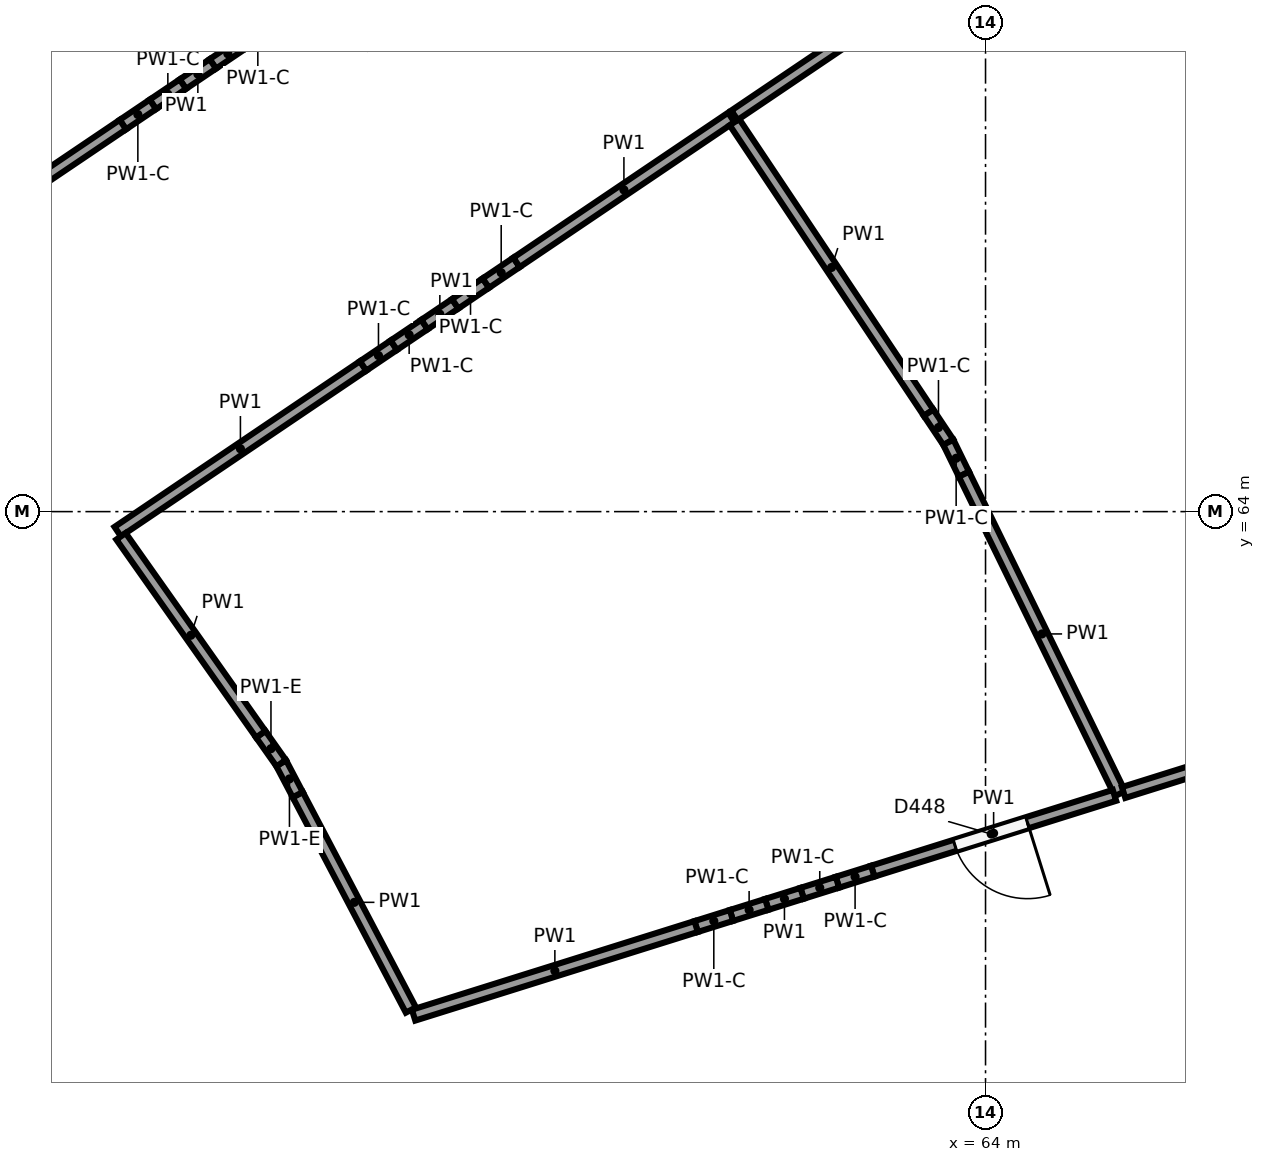
"""IFC4 building model, lengths in metres.
Left out: names, types, materials, properties, quantities, classifications, styles, units other than length and angle.
Written with IfcOpenShell. Run it as: python <this file> out.ifc"""

import sys

from ifc_helpers import new_model, si_unit, direction, frame, frame_2d, origin, origin_2d, place, context, subcontext, project, spatial, rectangle, circle, extrude, element, fill, save


model = new_model("IFC4")
c1 = context("Model", 3, precision=1e-05, world=origin(), true_north=direction((0.0, 1.0)))
c2 = subcontext(c1, "Body", "Model", "MODEL_VIEW")
j1 = project(units=[si_unit("LENGTHUNIT", "METRE"), si_unit("PLANEANGLEUNIT", "RADIAN")], contexts=[c1])
p1 = place(None, origin())
s1 = spatial("IfcSite", under=j1, at=p1, CompositionType="ELEMENT")
p2 = place(p1, origin())
s2 = spatial("IfcBuilding", under=s1, at=p2, CompositionType="ELEMENT")
p3 = place(p2, frame((0.0, 0.0, -4.0)))
s3 = spatial("IfcBuildingStorey", under=s2, at=p3, CompositionType="ELEMENT", Elevation=-4.0)
p4 = place(p3, frame((61.723, 56.716, -0.4), z_axis=(0.0, 0.0, 1.0), x_axis=(1.0, 0.0, 0.0)))
e1 = element("IfcColumn", 1, at=p4, inside=s3, PredefinedType="COLUMN", context=c2, shape_type="SweptSolid", body=[
    extrude(circle(Radius=0.45, at=origin_2d()), origin(), (0.0, 0.0, 1.0), 4.4),
])
p5 = place(p3, frame((62.964, 57.104, -0.4), z_axis=(0.0, 0.0, 1.0), x_axis=(1.0, 0.0, 0.0)))
e2 = element("IfcColumn", 2, at=p5, inside=s3, PredefinedType="COLUMN", context=c2, shape_type="SweptSolid", body=[
    extrude(circle(Radius=0.4, at=origin_2d()), origin(), (0.0, 0.0, 1.0), 4.4),
])
for number, where, z_axis, x_axis in (
    (3, (54.364, 60.513, -0.4), (0.0, 0.0, 1.0), (1.0, 0.0, 0.0)),
    (4, (59.049, 62.766, -0.4), (0.0, 0.0, 1.0), (1.0, 0.0, 0.0)),
):
    element("IfcColumn", number, at=place(p3, frame(where, z_axis=z_axis, x_axis=x_axis)), inside=s3, PredefinedType="COLUMN", context=c2, shape_type="SweptSolid", body=[
        extrude(circle(Radius=0.45, at=origin_2d()), origin(), (0.0, 0.0, 1.0), 4.4),
    ])
p6 = place(p3, frame((60.222, 63.331, -0.4), z_axis=(0.0, 0.0, 1.0), x_axis=(1.0, 0.0, 0.0)))
e5 = element("IfcColumn", 5, at=p6, inside=s3, PredefinedType="COLUMN", context=c2, shape_type="SweptSolid", body=[
    extrude(circle(Radius=0.4, at=origin_2d()), origin(), (0.0, 0.0, 1.0), 4.4),
])
p7 = place(p3, frame((54.82, 67.902, -0.4), z_axis=(0.0, 0.0, 1.0), x_axis=(1.0, 0.0, 0.0)))
e6 = element("IfcColumn", 6, at=p7, inside=s3, PredefinedType="COLUMN", context=c2, shape_type="SweptSolid", body=[
    extrude(circle(Radius=0.45, at=origin_2d()), origin(), (0.0, 0.0, 1.0), 4.4),
])
p8 = place(p3, frame((55.94, 68.658, -0.4), z_axis=(0.0, 0.0, 1.0), x_axis=(1.0, 0.0, 0.0)))
e7 = element("IfcColumn", 7, at=p8, inside=s3, PredefinedType="COLUMN", context=c2, shape_type="SweptSolid", body=[
    extrude(circle(Radius=0.4, at=origin_2d()), origin(), (0.0, 0.0, 1.0), 4.4),
])
p9 = place(p3, frame((52.582, 63.737, 0.0), z_axis=(0.0, 0.0, 1.0), x_axis=(0.82882615394, 0.559506216718, 0.0)))
e8 = element("IfcWall", 8, at=p9, inside=s3, PredefinedType="PARTITIONING", context=c2, shape_type="SweptSolid", body=[
    extrude(rectangle(XDim=3.896, YDim=0.15, at=frame_2d((1.948, 0.0))), origin(), (0.0, 0.0, 1.0), 3.6),
])
p10 = place(p3, frame((55.811, 65.917, 0.0), z_axis=(0.0, 0.0, 1.0), x_axis=(0.828953242646, 0.559317907372, 0.0)))
e9 = element("IfcWall", 9, at=p10, inside=s3, PredefinedType="PARTITIONING", context=c2, shape_type="SweptSolid", body=[
    extrude(rectangle(XDim=0.487, YDim=0.15, at=frame_2d((0.244, 0.0))), origin(), (0.0, 0.0, 1.0), 2.7),
])
p11 = place(p3, frame((56.215, 66.189, 0.0), z_axis=(0.0, 0.0, 1.0), x_axis=(0.828796357195, 0.559550353678, 0.0)))
e10 = element("IfcWall", 10, at=p11, inside=s3, PredefinedType="PARTITIONING", context=c2, shape_type="SweptSolid", body=[
    extrude(rectangle(XDim=0.487, YDim=0.15, at=frame_2d((0.243, 0.0))), origin(), (0.0, 0.0, 1.0), 2.7),
])
p12 = place(p3, frame((56.618, 66.461, 0.0), z_axis=(0.0, 0.0, 1.0), x_axis=(0.828953242646, 0.559317907372, 0.0)))
e11 = element("IfcWall", 11, at=p12, inside=s3, PredefinedType="PARTITIONING", context=c2, shape_type="SweptSolid", body=[
    extrude(rectangle(XDim=0.487, YDim=0.15, at=frame_2d((0.244, 0.0))), origin(), (0.0, 0.0, 1.0), 3.6),
])
p13 = place(p3, frame((57.022, 66.734, 0.0), z_axis=(0.0, 0.0, 1.0), x_axis=(0.828563830016, 0.559894614717, 0.0)))
e12 = element("IfcWall", 12, at=p13, inside=s3, PredefinedType="PARTITIONING", context=c2, shape_type="SweptSolid", body=[
    extrude(rectangle(XDim=0.487, YDim=0.15, at=frame_2d((0.244, 0.0))), origin(), (0.0, 0.0, 1.0), 2.7),
])
p14 = place(p3, frame((57.426, 67.007, 0.0), z_axis=(0.0, 0.0, 1.0), x_axis=(0.828796357195, 0.559550353678, 0.0)))
e13 = element("IfcWall", 13, at=p14, inside=s3, PredefinedType="PARTITIONING", context=c2, shape_type="SweptSolid", body=[
    extrude(rectangle(XDim=0.487, YDim=0.15, at=frame_2d((0.243, 0.0))), origin(), (0.0, 0.0, 1.0), 2.7),
])
p15 = place(p3, frame((57.829, 67.279, 0.0), z_axis=(0.0, 0.0, 1.0), x_axis=(0.828841201566, 0.559483925226, 0.0)))
e14 = element("IfcWall", 14, at=p15, inside=s3, PredefinedType="PARTITIONING", context=c2, shape_type="SweptSolid", body=[
    extrude(rectangle(XDim=3.409, YDim=0.15, at=frame_2d((1.705, 0.0))), origin(), (0.0, 0.0, 1.0), 3.6),
])
p16 = place(p3, frame((60.697, 69.124, 0.0), z_axis=(0.0, 0.0, 1.0), x_axis=(0.555582071925, -0.831461701677, 0.0)))
e15 = element("IfcWall", 15, at=p16, inside=s3, PredefinedType="PARTITIONING", context=c2, shape_type="SweptSolid", body=[
    extrude(rectangle(XDim=4.598, YDim=0.15, at=frame_2d((2.299, 0.0))), origin(), (0.0, 0.0, 1.0), 3.6),
])
p17 = place(p3, frame((63.251, 65.301, 0.0), z_axis=(0.0, 0.0, 1.0), x_axis=(0.555302810798, -0.831648235927, 0.0)))
e16 = element("IfcWall", 16, at=p17, inside=s3, PredefinedType="PARTITIONING", context=c2, shape_type="SweptSolid", body=[
    extrude(rectangle(XDim=0.467, YDim=0.15, at=frame_2d((0.234, 0.0))), origin(), (0.0, 0.0, 1.0), 2.7),
])
p18 = place(p3, frame((63.511, 64.912, 0.0), z_axis=(0.0, 0.0, 1.0), x_axis=(0.439050948337, -0.898462166574, 0.0)))
e17 = element("IfcWall", 17, at=p18, inside=s3, PredefinedType="PARTITIONING", context=c2, shape_type="SweptSolid", body=[
    extrude(rectangle(XDim=0.468, YDim=0.15, at=frame_2d((0.234, 0.0))), origin(), (0.0, 0.0, 1.0), 2.7),
])
p19 = place(p3, frame((63.716, 64.492, 0.0), z_axis=(0.0, 0.0, 1.0), x_axis=(0.438947034321, -0.898512938728, 0.0)))
e18 = element("IfcWall", 18, at=p19, inside=s3, PredefinedType="PARTITIONING", context=c2, shape_type="SweptSolid", body=[
    extrude(rectangle(XDim=4.677, YDim=0.15, at=frame_2d((2.338, 0.0))), origin(), (0.0, 0.0, 1.0), 3.6),
])
p20 = place(p3, frame((65.697, 60.267, 0.0), z_axis=(0.0, 0.0, 1.0), x_axis=(-0.95420717929, -0.299146551026, 0.0)))
e19 = element("IfcWall", 19, at=p20, inside=s3, PredefinedType="PARTITIONING", context=c2, shape_type="SweptSolid", body=[
    extrude(rectangle(XDim=3.333, YDim=0.15, at=frame_2d((1.667, 0.0))), origin(), (0.0, 0.0, 1.0), 3.6),
])
p21 = place(p20, frame((1.2, 0.0, 0.0)))
e20 = element("IfcOpeningElement", 20, at=p21, cuts=e19, PredefinedType="OPENING", context=c2, shape_type="SweptSolid", body=[
    extrude(rectangle(XDim=1.0, YDim=2.1, at=frame_2d((0.5, 1.05))), frame((0.0, 0.085, 0.0), z_axis=(0.0, -1.0, 0.0), x_axis=(1.0, 0.0, 0.0)), (0.0, 0.0, 1.0), 0.17),
])
p22 = place(p3, frame((62.516, 59.27, 0.0), z_axis=(0.0, 0.0, 1.0), x_axis=(-0.954194187562, -0.299187988432, 0.0)))
e21 = element("IfcWall", 21, at=p22, inside=s3, PredefinedType="PARTITIONING", context=c2, shape_type="SweptSolid", body=[
    extrude(rectangle(XDim=0.487, YDim=0.15, at=frame_2d((0.244, 0.0))), origin(), (0.0, 0.0, 1.0), 2.7),
])
p23 = place(p3, frame((62.051, 59.124, 0.0), z_axis=(0.0, 0.0, 1.0), x_axis=(-0.954149295482, -0.299331124226, 0.0)))
e22 = element("IfcWall", 22, at=p23, inside=s3, PredefinedType="PARTITIONING", context=c2, shape_type="SweptSolid", body=[
    extrude(rectangle(XDim=0.487, YDim=0.15, at=frame_2d((0.243, 0.0))), origin(), (0.0, 0.0, 1.0), 2.7),
])
p24 = place(p3, frame((61.587, 58.978, 0.0), z_axis=(0.0, 0.0, 1.0), x_axis=(-0.954194187562, -0.299187988432, 0.0)))
e23 = element("IfcWall", 23, at=p24, inside=s3, PredefinedType="PARTITIONING", context=c2, shape_type="SweptSolid", body=[
    extrude(rectangle(XDim=0.487, YDim=0.15, at=frame_2d((0.244, 0.0))), origin(), (0.0, 0.0, 1.0), 3.6),
])
p25 = place(p3, frame((61.122, 58.833, 0.0), z_axis=(0.0, 0.0, 1.0), x_axis=(-0.954292408643, -0.298874553627, 0.0)))
e24 = element("IfcWall", 24, at=p25, inside=s3, PredefinedType="PARTITIONING", context=c2, shape_type="SweptSolid", body=[
    extrude(rectangle(XDim=0.487, YDim=0.15, at=frame_2d((0.243, 0.0))), origin(), (0.0, 0.0, 1.0), 2.7),
])
p26 = place(p3, frame((60.657, 58.687, 0.0), z_axis=(0.0, 0.0, 1.0), x_axis=(-0.954194187562, -0.299187988432, 0.0)))
e25 = element("IfcWall", 25, at=p26, inside=s3, PredefinedType="PARTITIONING", context=c2, shape_type="SweptSolid", body=[
    extrude(rectangle(XDim=0.487, YDim=0.15, at=frame_2d((0.244, 0.0))), origin(), (0.0, 0.0, 1.0), 2.7),
])
p27 = place(p3, frame((60.192, 58.541, 0.0), z_axis=(0.0, 0.0, 1.0), x_axis=(-0.954184030199, -0.299220381178, 0.0)))
e26 = element("IfcWall", 26, at=p27, inside=s3, PredefinedType="PARTITIONING", context=c2, shape_type="SweptSolid", body=[
    extrude(rectangle(XDim=3.896, YDim=0.15, at=frame_2d((1.948, 0.0))), origin(), (0.0, 0.0, 1.0), 3.6),
])
p28 = place(p3, frame((56.439, 57.443, 0.0), z_axis=(0.0, 0.0, 1.0), x_axis=(-0.465186694802, 0.885212595357, 0.0)))
e27 = element("IfcWall", 27, at=p28, inside=s3, PredefinedType="PARTITIONING", context=c2, shape_type="SweptSolid", body=[
    extrude(rectangle(XDim=3.2, YDim=0.15, at=frame_2d((1.6, 0.0))), origin(), (0.0, 0.0, 1.0), 3.6),
])
p29 = place(p3, frame((54.95, 60.276, 0.0), z_axis=(0.0, 0.0, 1.0), x_axis=(-0.465058676895, 0.885279858036, 0.0)))
e28 = element("IfcWall", 28, at=p29, inside=s3, PredefinedType="PARTITIONING", context=c2, shape_type="SweptSolid", body=[
    extrude(rectangle(XDim=0.468, YDim=0.15, at=frame_2d((0.234, 0.0))), origin(), (0.0, 0.0, 1.0), 2.85),
])
p30 = place(p3, frame((54.733, 60.691, 0.0), z_axis=(0.0, 0.0, 1.0), x_axis=(-0.576868319656, 0.816837157442, 0.0)))
e29 = element("IfcWall", 29, at=p30, inside=s3, PredefinedType="PARTITIONING", context=c2, shape_type="SweptSolid", body=[
    extrude(rectangle(XDim=0.466, YDim=0.15, at=frame_2d((0.233, 0.0))), origin(), (0.0, 0.0, 1.0), 2.85),
])
p31 = place(p3, frame((54.464, 61.071, 0.0), z_axis=(0.0, 0.0, 1.0), x_axis=(-0.576788435752, 0.816893567353, 0.0)))
e30 = element("IfcWall", 30, at=p31, inside=s3, PredefinedType="PARTITIONING", context=c2, shape_type="SweptSolid", body=[
    extrude(rectangle(XDim=3.188, YDim=0.15, at=frame_2d((1.594, 0.0))), origin(), (0.0, 0.0, 1.0), 3.6),
])
p32 = place(p3, frame((60.696, 69.214, 0.0), z_axis=(0.0, 0.0, 1.0), x_axis=(0.828825631308, 0.559506990919, 0.0)))
e31 = element("IfcWall", 31, at=p32, inside=s3, PredefinedType="PARTITIONING", context=c2, shape_type="SweptSolid", body=[
    extrude(rectangle(XDim=3.931, YDim=0.15, at=frame_2d((1.965, 0.0))), origin(), (0.0, 0.0, 1.0), 3.6),
])
p33 = place(p3, frame((69.97, 61.607, 0.0), z_axis=(0.0, 0.0, 1.0), x_axis=(-0.954191084053, -0.299197886211, 0.0)))
e32 = element("IfcWall", 32, at=p33, inside=s3, PredefinedType="PARTITIONING", context=c2, shape_type="SweptSolid", body=[
    extrude(rectangle(XDim=4.353, YDim=0.15, at=frame_2d((2.176, 0.0))), origin(), (0.0, 0.0, 1.0), 3.6),
])
p34 = place(p3, frame((54.228, 70.157, 0.0), z_axis=(0.0, 0.0, 1.0), x_axis=(-0.828961577554, -0.559305554182, 0.0)))
e33 = element("IfcWall", 33, at=p34, inside=s3, PredefinedType="PARTITIONING", context=c2, shape_type="SweptSolid", body=[
    extrude(rectangle(XDim=0.476, YDim=0.15, at=frame_2d((0.238, 0.0))), origin(), (0.0, 0.0, 1.0), 2.7),
])
p35 = place(p3, frame((53.833, 69.89, 0.0), z_axis=(0.0, 0.0, 1.0), x_axis=(-0.828563254438, -0.559895466489, 0.0)))
e34 = element("IfcWall", 34, at=p35, inside=s3, PredefinedType="PARTITIONING", context=c2, shape_type="SweptSolid", body=[
    extrude(rectangle(XDim=0.476, YDim=0.15, at=frame_2d((0.238, 0.0))), origin(), (0.0, 0.0, 1.0), 3.6),
])
p36 = place(p3, frame((53.439, 69.624, 0.0), z_axis=(0.0, 0.0, 1.0), x_axis=(-0.828961577554, -0.559305554182, 0.0)))
e35 = element("IfcWall", 35, at=p36, inside=s3, PredefinedType="PARTITIONING", context=c2, shape_type="SweptSolid", body=[
    extrude(rectangle(XDim=0.476, YDim=0.15, at=frame_2d((0.238, 0.0))), origin(), (0.0, 0.0, 1.0), 2.7),
])
p37 = place(p3, frame((53.044, 69.357, 0.0), z_axis=(0.0, 0.0, 1.0), x_axis=(-0.828801105453, -0.559543320575, 0.0)))
e36 = element("IfcWall", 36, at=p37, inside=s3, PredefinedType="PARTITIONING", context=c2, shape_type="SweptSolid", body=[
    extrude(rectangle(XDim=0.476, YDim=0.15, at=frame_2d((0.238, 0.0))), origin(), (0.0, 0.0, 1.0), 2.7),
])
p38 = place(p3, frame((52.65, 69.091, 0.0), z_axis=(0.0, 0.0, 1.0), x_axis=(-0.828831583129, -0.559498174088, 0.0)))
e37 = element("IfcWall", 37, at=p38, inside=s3, PredefinedType="PARTITIONING", context=c2, shape_type="SweptSolid", body=[
    extrude(rectangle(XDim=3.809, YDim=0.15, at=frame_2d((1.904, 0.0))), origin(), (0.0, 0.0, 1.0), 3.6),
])
p39 = place(p21, origin())
e38 = element("IfcDoor", 38, at=p39, inside=s3, OperationType="SINGLE_SWING_LEFT", PredefinedType="DOOR", context=c2, shape_type="SweptSolid", body=[
    extrude(rectangle(XDim=1.0, YDim=2.1, at=frame_2d((0.5, 1.05))), frame((0.0, 0.025, 0.0), z_axis=(0.0, -1.0, 0.0), x_axis=(1.0, 0.0, 0.0)), (0.0, 0.0, 1.0), 0.05),
])
fill(e20, e38)
save(model, sys.argv[1])
